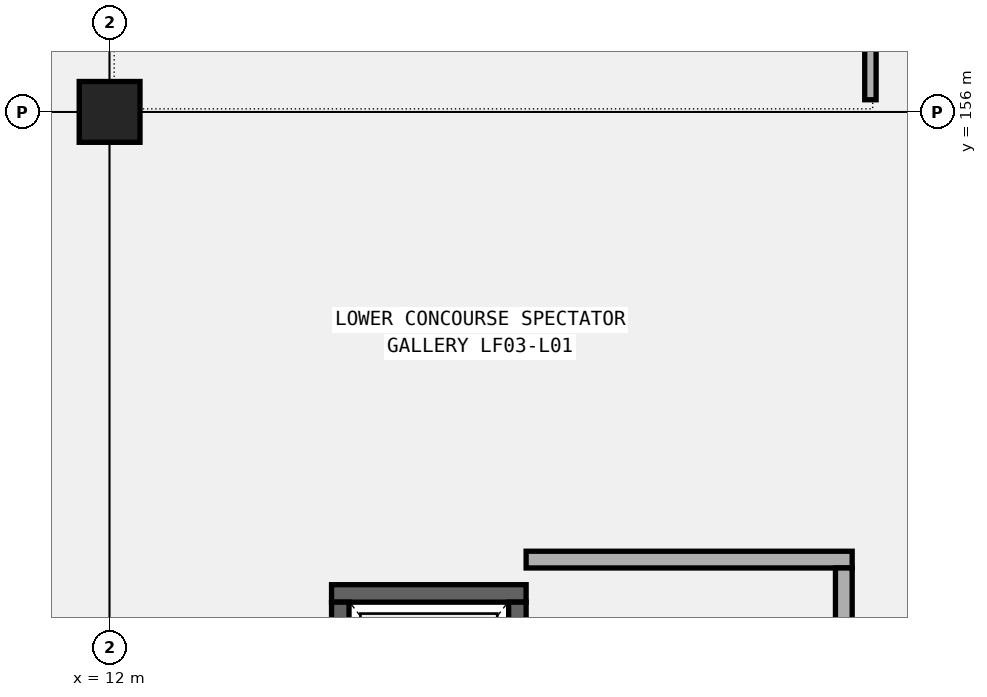
"""IFC4 building model, lengths in metres.
Left out: names, types, materials, properties, quantities, classifications, styles, units other than length and angle.
Written with IfcOpenShell. Run it as: python <this file> out.ifc"""

import sys

from ifc_helpers import new_model, si_unit, direction, frame, frame_2d, origin, origin_2d, place, context, subcontext, project, spatial, rectangle, extrude, element, save


model = new_model("IFC4")
c1 = context("Model", 3, precision=1e-05, world=origin(), true_north=direction((0.0, 1.0)))
c2 = subcontext(c1, "Body", "Model", "MODEL_VIEW")
j1 = project(units=[si_unit("LENGTHUNIT", "METRE"), si_unit("PLANEANGLEUNIT", "RADIAN")], contexts=[c1])
p1 = place(None, origin())
s1 = spatial("IfcSite", under=j1, at=p1, CompositionType="ELEMENT")
p2 = place(p1, origin())
s2 = spatial("IfcBuilding", under=s1, at=p2, CompositionType="ELEMENT")
p3 = place(p2, frame((0.0, 0.0, 5.4)))
s3 = spatial("IfcBuildingStorey", under=s2, at=p3, CompositionType="ELEMENT", Elevation=5.4)
p4 = place(p3, frame((12.0, 156.0, 0.0), z_axis=(0.0, 0.0, 1.0), x_axis=(1.0, 0.0, 0.0)))
e1 = element("IfcColumn", 1, at=p4, inside=s3, PredefinedType="COLUMN", context=c2, shape_type="SweptSolid", body=[
    extrude(rectangle(XDim=0.8, YDim=0.8, at=origin_2d()), origin(), (0.0, 0.0, 1.0), 4.8),
])
p5 = place(p3, frame((14.92, 149.665, 0.0), z_axis=(0.0, 0.0, 1.0), x_axis=(1.0, 0.0, 0.0)))
e2 = element("IfcWall", 2, at=p5, inside=s3, PredefinedType="SHEAR", context=c2, shape_type="SweptSolid", body=[
    extrude(rectangle(XDim=2.56, YDim=0.23, at=frame_2d((1.28, 0.0))), origin(), (0.0, 0.0, 1.0), 4.55),
])
p6 = place(p3, frame((15.035, 146.85, 0.0), z_axis=(0.0, 0.0, 1.0), x_axis=(0.0, 1.0, 0.0)))
e3 = element("IfcWall", 3, at=p6, inside=s3, PredefinedType="SHEAR", context=c2, shape_type="SweptSolid", body=[
    extrude(rectangle(XDim=2.7, YDim=0.23, at=frame_2d((1.35, 0.0))), origin(), (0.0, 0.0, 1.0), 4.55),
])
p7 = place(p3, frame((17.365, 146.85, 0.0), z_axis=(0.0, 0.0, 1.0), x_axis=(0.0, 1.0, 0.0)))
e4 = element("IfcWall", 4, at=p7, inside=s3, PredefinedType="SHEAR", context=c2, shape_type="SweptSolid", body=[
    extrude(rectangle(XDim=2.7, YDim=0.23, at=frame_2d((1.35, 0.0))), origin(), (0.0, 0.0, 1.0), 4.55),
])
p8 = place(p7, frame((0.8, 0.0, 0.0)))
e5 = element("IfcOpeningElement", 5, at=p8, cuts=e4, PredefinedType="OPENING", context=c2, shape_type="SweptSolid", body=[
    extrude(rectangle(XDim=1.1, YDim=2.15, at=frame_2d((0.55, 1.075))), frame((0.0, 0.125, 0.0), z_axis=(0.0, -1.0, 0.0), x_axis=(1.0, 0.0, 0.0)), (0.0, 0.0, 1.0), 0.25),
])
p9 = place(p3, frame((17.48, 150.11, 0.0), z_axis=(0.0, 0.0, 1.0), x_axis=(1.0, 0.0, 0.0)))
e6 = element("IfcWall", 6, at=p9, inside=s3, PredefinedType="SOLIDWALL", context=c2, shape_type="SweptSolid", body=[
    extrude(rectangle(XDim=4.29, YDim=0.22, at=frame_2d((2.145, 0.0))), origin(), (0.0, 0.0, 1.0), 3.92),
])
p10 = place(p3, frame((21.66, 146.4, 0.0), z_axis=(0.0, 0.0, 1.0), x_axis=(0.0, 1.0, 0.0)))
e7 = element("IfcWall", 7, at=p10, inside=s3, PredefinedType="SOLIDWALL", context=c2, shape_type="SweptSolid", body=[
    extrude(rectangle(XDim=3.6, YDim=0.22, at=frame_2d((1.8, 0.0))), origin(), (0.0, 0.0, 1.0), 3.92),
])
p11 = place(p10, frame((1.15, 0.0, 0.0)))
e8 = element("IfcOpeningElement", 8, at=p11, cuts=e7, PredefinedType="OPENING", context=c2, shape_type="SweptSolid", body=[
    extrude(rectangle(XDim=1.3, YDim=2.15, at=frame_2d((0.65, 1.075))), frame((0.0, 0.12, 0.0), z_axis=(0.0, -1.0, 0.0), x_axis=(1.0, 0.0, 0.0)), (0.0, 0.0, 1.0), 0.24),
])
p12 = place(p3, frame((22.01, 156.16, 0.0), z_axis=(0.0, 0.0, 1.0), x_axis=(0.0, 1.0, 0.0)))
e9 = element("IfcWall", 9, at=p12, inside=s3, PredefinedType="PARTITIONING", context=c2, shape_type="SweptSolid", body=[
    extrude(rectangle(XDim=11.668, YDim=0.15, at=frame_2d((5.834, 0.0))), origin(), (0.0, 0.0, 1.0), 3.92),
])
p13 = place(p12, frame((5.39, 0.0, 0.0)))
e10 = element("IfcOpeningElement", 10, at=p13, cuts=e9, PredefinedType="OPENING", context=c2, shape_type="SweptSolid", body=[
    extrude(rectangle(XDim=0.9, YDim=2.06, at=frame_2d((0.45, 1.03))), frame((0.0, 0.085, 0.0), z_axis=(0.0, -1.0, 0.0), x_axis=(1.0, 0.0, 0.0)), (0.0, 0.0, 1.0), 0.17),
])
save(model, sys.argv[1])
